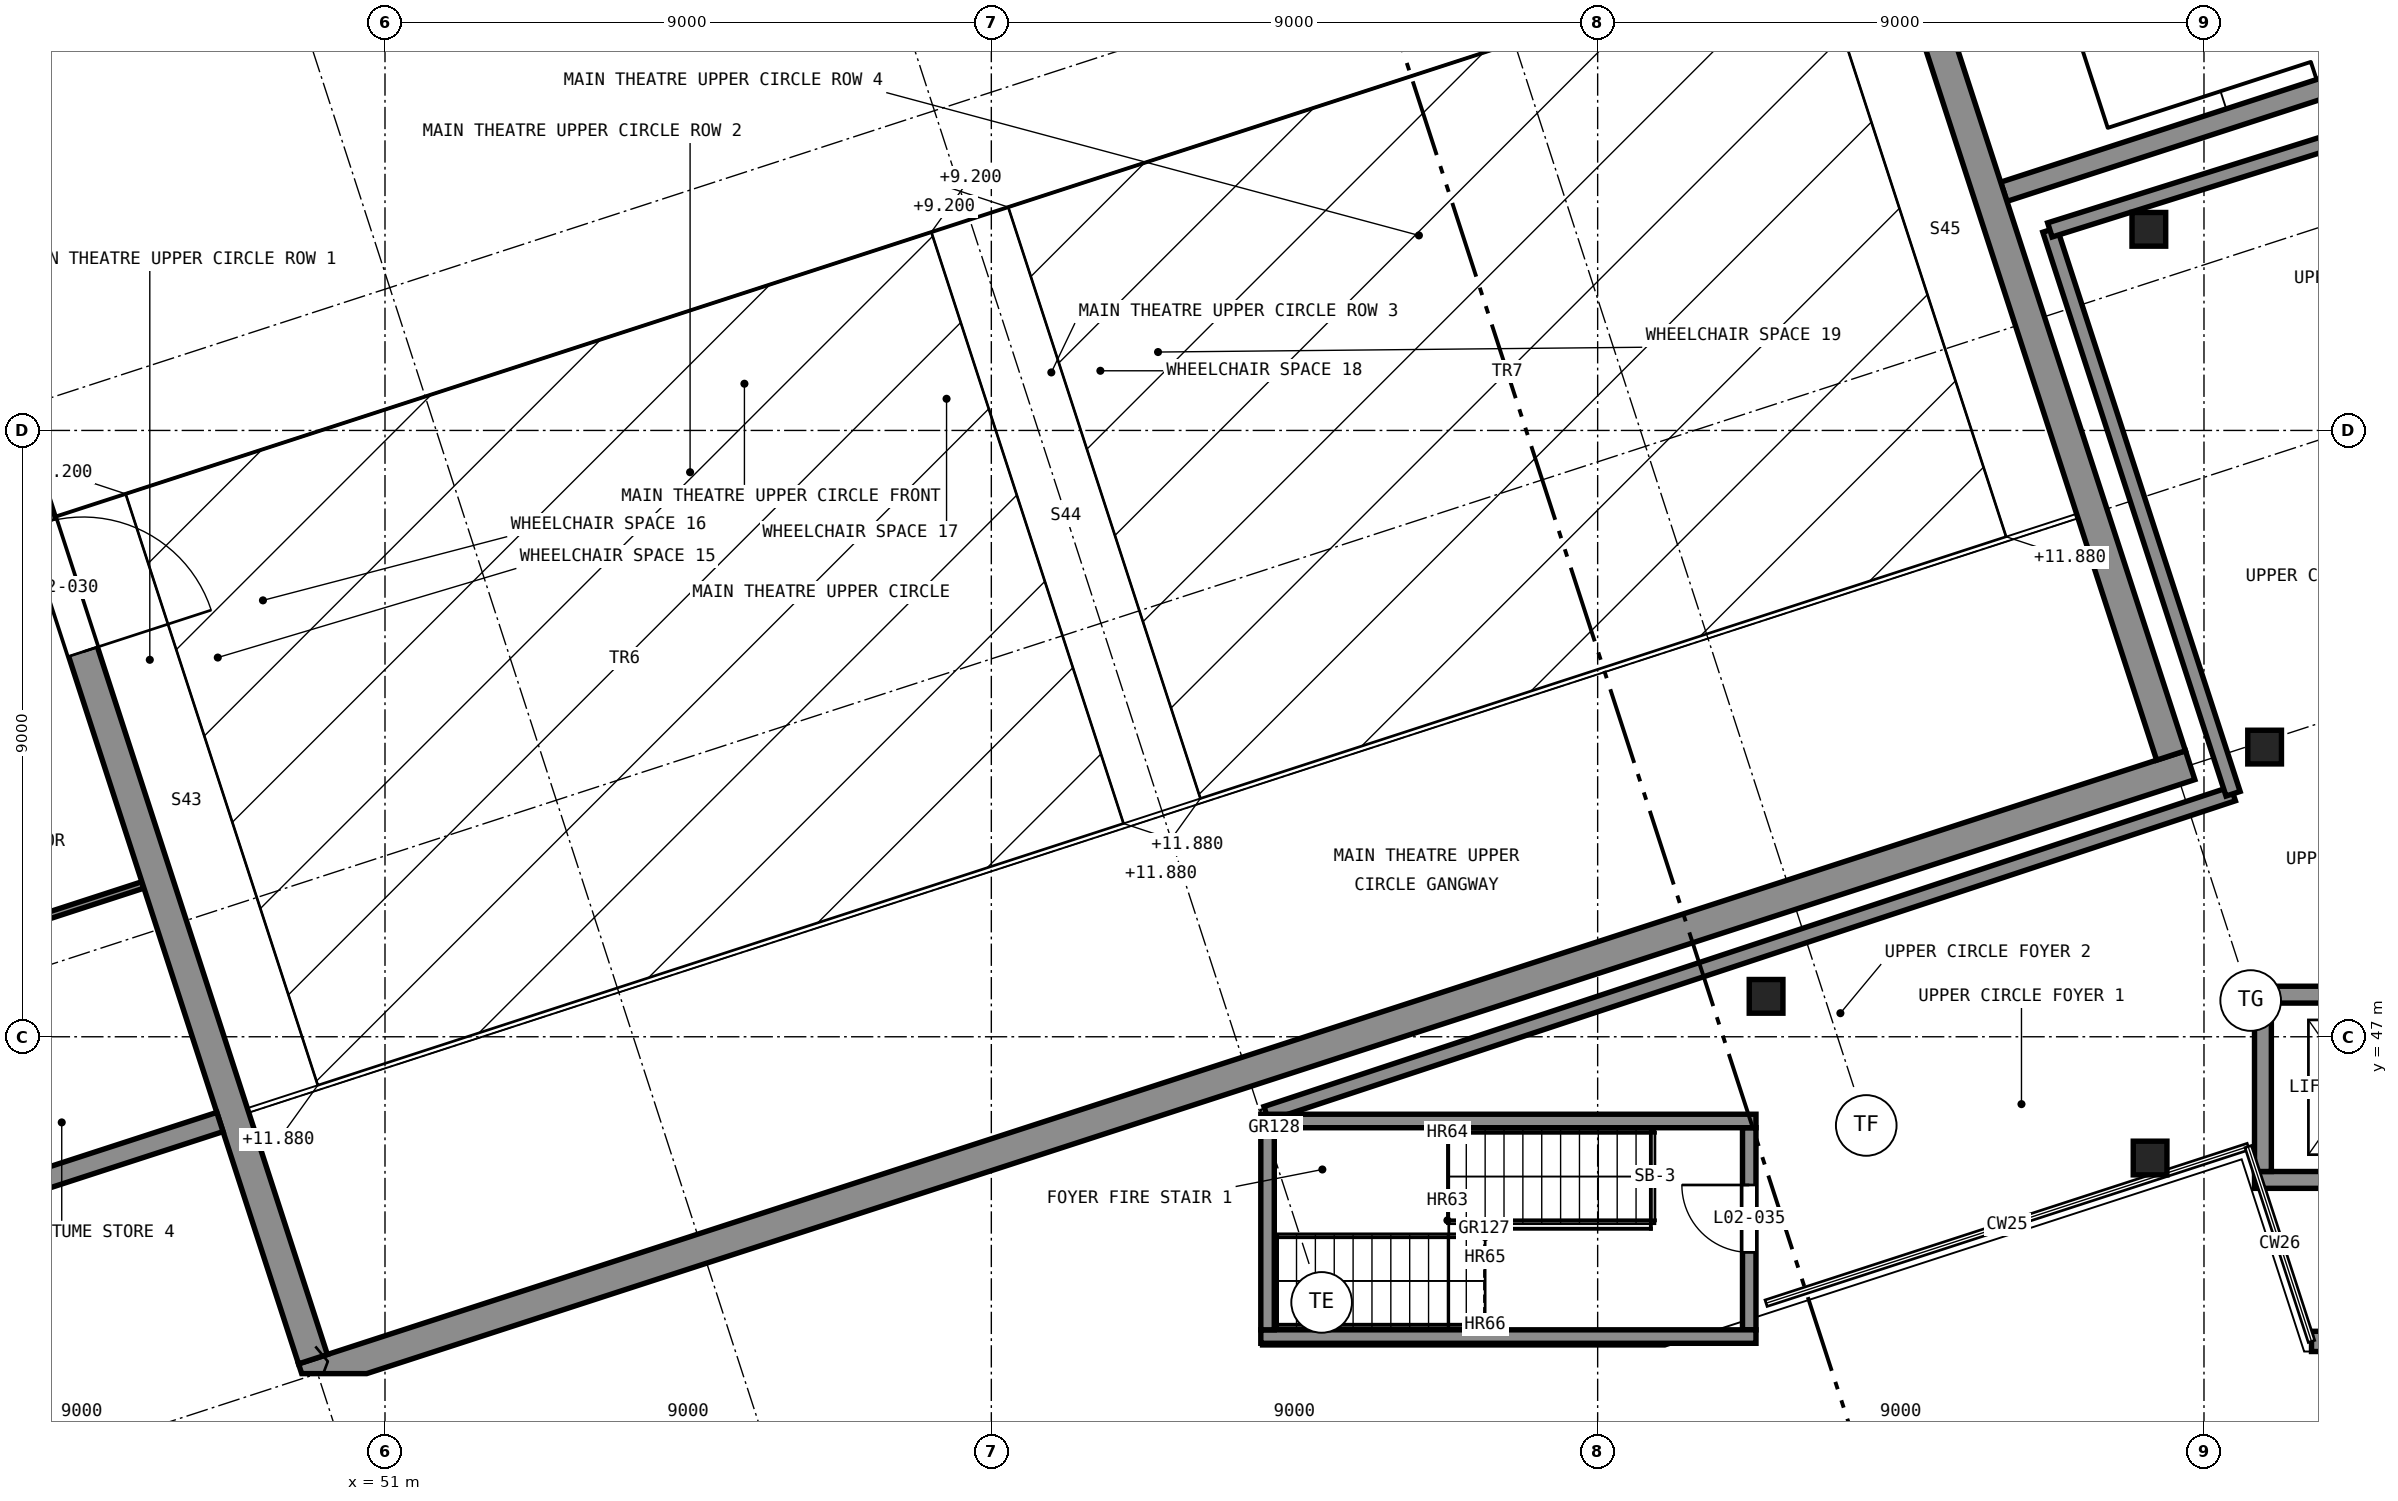
"""IFC4 building model, lengths in metres.
Left out: names, types, materials, properties, quantities, classifications, styles, units other than length and angle.
Written with IfcOpenShell. Run it as: python <this file> out.ifc"""

import sys

from ifc_helpers import new_model, si_unit, direction, frame, frame_2d, origin, origin_2d, place, context, subcontext, project, spatial, rectangle, extrude, element, fill, save


model = new_model("IFC4")
c1 = context("Model", 3, precision=1e-05, world=origin(), true_north=direction((0.0, 1.0)))
c2 = subcontext(c1, "Body", "Model", "MODEL_VIEW")
j1 = project(units=[si_unit("LENGTHUNIT", "METRE"), si_unit("PLANEANGLEUNIT", "RADIAN")], contexts=[c1])
p1 = place(None, origin())
s1 = spatial("IfcSite", under=j1, at=p1, CompositionType="ELEMENT")
p2 = place(p1, origin())
s2 = spatial("IfcBuilding", under=s1, at=p2, CompositionType="ELEMENT")
p3 = place(p2, frame((0.0, 0.0, 9.5)))
s3 = spatial("IfcBuildingStorey", under=s2, at=p3, CompositionType="ELEMENT", Elevation=9.5)
p4 = place(p3, frame((49.786, 41.93, 0.0), z_axis=(0.0, 0.0, 1.0), x_axis=(0.951055937194, 0.309018776661, 0.0)))
e1 = element("IfcWall", 1, at=p4, inside=s3, PredefinedType="SHEAR", context=c2, shape_type="SweptSolid", body=[
    extrude(rectangle(XDim=29.45, YDim=0.45, at=frame_2d((14.725, 0.0))), origin(), (0.0, 0.0, 1.0), 4.0),
])
p5 = place(p3, frame((49.93, 42.214, 0.0), z_axis=(0.0, 0.0, 1.0), x_axis=(-0.309016215614, 0.95105676933, 0.0)))
e2 = element("IfcWall", 2, at=p5, inside=s3, PredefinedType="SHEAR", context=c2, shape_type="SweptSolid", body=[
    extrude(rectangle(XDim=27.975, YDim=0.45, at=frame_2d((13.988, 0.0))), origin(), (0.0, 0.0, 1.0), 4.0),
])
p6 = place(p5, frame((11.042, 0.0, 0.0)))
e3 = element("IfcOpeningElement", 3, at=p6, cuts=e2, PredefinedType="OPENING", context=c2, shape_type="SweptSolid", body=[
    extrude(rectangle(XDim=2.0, YDim=2.4, at=frame_2d((1.0, 1.2))), frame((0.0, 0.235, 0.0), z_axis=(0.0, -1.0, 0.0), x_axis=(1.0, 0.0, 0.0)), (0.0, 0.0, 1.0), 0.47),
])
p7 = place(p3, frame((77.511, 51.176, 0.0), z_axis=(0.0, 0.0, 1.0), x_axis=(-0.309018780445, 0.951055935964, 0.0)))
e4 = element("IfcWall", 4, at=p7, inside=s3, PredefinedType="SHEAR", context=c2, shape_type="SweptSolid", body=[
    extrude(rectangle(XDim=27.975, YDim=0.45, at=frame_2d((13.987, 0.0))), origin(), (0.0, 0.0, 1.0), 4.0),
])
p8 = place(p7, frame((11.075, 0.0, 0.0)))
e5 = element("IfcOpeningElement", 5, at=p8, cuts=e4, PredefinedType="OPENING", context=c2, shape_type="SweptSolid", body=[
    extrude(rectangle(XDim=1.6, YDim=2.4, at=frame_2d((0.8, 1.2))), frame((0.0, 0.235, 0.0), z_axis=(0.0, -1.0, 0.0), x_axis=(1.0, 0.0, 0.0)), (0.0, 0.0, 1.0), 0.47),
])
p9 = place(p3, frame((48.55, 45.735, 0.0), z_axis=(0.0, 0.0, 1.0), x_axis=(-0.951061216338, -0.309002528757, 0.0)))
e6 = element("IfcWall", 6, at=p9, inside=s3, PredefinedType="SOLIDWALL", context=c2, shape_type="SweptSolid", body=[
    extrude(rectangle(XDim=15.925, YDim=0.3, at=frame_2d((7.962, 0.0))), origin(), (0.0, 0.0, 1.0), 4.0),
])
p10 = place(p3, frame((75.029, 59.543, 0.0), z_axis=(0.0, 0.0, 1.0), x_axis=(0.951057649576, 0.309013506475, 0.0)))
e7 = element("IfcWall", 7, at=p10, inside=s3, PredefinedType="SOLIDWALL", context=c2, shape_type="SweptSolid", body=[
    extrude(rectangle(XDim=7.075, YDim=0.3, at=frame_2d((3.538, 0.0))), origin(), (0.0, 0.0, 1.0), 3.7),
])
for number, where, z_axis, x_axis in (
    (8, (64.0, 42.55, 0.0), (0.0, 0.0, 1.0), (1.0, 0.0, 0.0)),
    (9, (71.35, 45.75, 0.0), (0.0, 0.0, 1.0), (-1.0, 0.0, 0.0)),
):
    element("IfcWall", number, at=place(p3, frame(where, z_axis=z_axis, x_axis=x_axis)), inside=s3, PredefinedType="SHEAR", context=c2, shape_type="SweptSolid", body=[
        extrude(rectangle(XDim=7.35, YDim=0.2, at=frame_2d((3.675, 0.0))), origin(), (0.0, 0.0, 1.0), 4.0),
    ])
p11 = place(p3, frame((64.1, 45.65, 0.0), z_axis=(0.0, 0.0, 1.0), x_axis=(0.0, -1.0, 0.0)))
e10 = element("IfcWall", 10, at=p11, inside=s3, PredefinedType="SHEAR", context=c2, shape_type="SweptSolid", body=[
    extrude(rectangle(XDim=3.0, YDim=0.2, at=frame_2d((1.5, 0.0))), origin(), (0.0, 0.0, 1.0), 4.0),
])
p12 = place(p3, frame((71.25, 42.65, 0.0), z_axis=(0.0, 0.0, 1.0), x_axis=(0.0, 1.0, 0.0)))
e11 = element("IfcWall", 11, at=p12, inside=s3, PredefinedType="SHEAR", context=c2, shape_type="SweptSolid", body=[
    extrude(rectangle(XDim=3.0, YDim=0.2, at=frame_2d((1.5, 0.0))), origin(), (0.0, 0.0, 1.0), 4.0),
])
p13 = place(p12, frame((1.15, 0.0, 0.0)))
e12 = element("IfcOpeningElement", 12, at=p13, cuts=e11, PredefinedType="OPENING", context=c2, shape_type="SweptSolid", body=[
    extrude(rectangle(XDim=1.0, YDim=2.1, at=frame_2d((0.5, 1.05))), frame((0.0, 0.11, 0.0), z_axis=(0.0, -1.0, 0.0), x_axis=(1.0, 0.0, 0.0)), (0.0, 0.0, 1.0), 0.22),
])
for number, where, z_axis, x_axis in (
    (13, (78.75, 44.875, 0.0), (0.0, 0.0, 1.0), (1.0, 0.0, 0.0)),
    (14, (81.75, 47.625, 0.0), (0.0, 0.0, 1.0), (-1.0, 0.0, 0.0)),
):
    element("IfcWall", number, at=place(p3, frame(where, z_axis=z_axis, x_axis=x_axis)), inside=s3, PredefinedType="SHEAR", context=c2, shape_type="SweptSolid", body=[
        extrude(rectangle(XDim=3.0, YDim=0.25, at=frame_2d((1.5, 0.0))), origin(), (0.0, 0.0, 1.0), 4.0),
    ])
p14 = place(p3, frame((78.875, 47.5, 0.0), z_axis=(0.0, 0.0, 1.0), x_axis=(0.0, -1.0, 0.0)))
e15 = element("IfcWall", 15, at=p14, inside=s3, PredefinedType="SHEAR", context=c2, shape_type="SweptSolid", body=[
    extrude(rectangle(XDim=2.5, YDim=0.25, at=frame_2d((1.25, 0.0))), origin(), (0.0, 0.0, 1.0), 4.0),
])
for number, where, z_axis, x_axis in (
    (16, (77.2, 45.2, 0.0), (0.0, 0.0, 1.0), (1.0, 0.0, 0.0)),
    (17, (71.5, 47.6, 0.0), (0.0, 0.0, 1.0), (1.0, 0.0, 0.0)),
    (18, (78.9, 51.3, 0.0), (0.0, 0.0, 1.0), (1.0, 0.0, 0.0)),
    (19, (77.182, 58.985, 0.0), (0.0, 0.0, 1.0), (1.0, 0.0, 0.0)),
):
    element("IfcColumn", number, at=place(p3, frame(where, z_axis=z_axis, x_axis=x_axis)), inside=s3, PredefinedType="COLUMN", context=c2, shape_type="SweptSolid", body=[
        extrude(rectangle(XDim=0.5, YDim=0.5, at=origin_2d()), origin(), (0.0, 0.0, 1.0), 4.0),
    ])
p15 = place(p3, frame((79.596, 42.478, 0.0), z_axis=(0.0, 0.0, 1.0), x_axis=(1.0, 0.0, 0.0)))
e20 = element("IfcWall", 20, at=p15, inside=s3, PredefinedType="SOLIDWALL", context=c2, shape_type="SweptSolid", body=[
    extrude(rectangle(XDim=2.941, YDim=0.3, at=frame_2d((1.471, 0.0))), origin(), (0.0, 0.0, 1.0), 3.7),
])
p16 = place(p3, frame((64.081, 45.859, 0.0), z_axis=(0.0, 0.0, 1.0), x_axis=(0.949388338269, 0.314104732786, 0.0)))
e21 = element("IfcWall", 21, at=p16, inside=s3, PredefinedType="SOLIDWALL", context=c2, shape_type="SweptSolid", body=[
    extrude(rectangle(XDim=15.116, YDim=0.22, at=frame_2d((7.558, 0.0))), origin(), (0.0, 0.0, 1.0), 3.7),
])
p17 = place(p3, frame((78.432, 50.607, 0.0), z_axis=(0.0, 0.0, 1.0), x_axis=(-0.309027731765, 0.951053027439, 0.0)))
e22 = element("IfcWall", 22, at=p17, inside=s3, PredefinedType="SOLIDWALL", context=c2, shape_type="SweptSolid", body=[
    extrude(rectangle(XDim=8.8, YDim=0.22, at=frame_2d((4.4, 0.0))), origin(), (0.0, 0.0, 1.0), 3.7),
])
p18 = place(p3, frame((75.712, 58.977, 0.0), z_axis=(0.0, 0.0, 1.0), x_axis=(0.954020604523, 0.299741031802, 0.0)))
e23 = element("IfcWall", 23, at=p18, inside=s3, PredefinedType="SOLIDWALL", context=c2, shape_type="SweptSolid", body=[
    extrude(rectangle(XDim=7.271, YDim=0.22, at=frame_2d((3.635, 0.0))), origin(), (0.0, 0.0, 1.0), 3.7),
])
p19 = place(p3, frame((44.53, 48.319, 0.0), z_axis=(0.0, 0.0, 1.0), x_axis=(0.951053046121, 0.30902767427, 0.0)))
e24 = element("IfcWall", 24, at=p19, inside=s3, PredefinedType="PARTITIONING", context=c2, shape_type="SweptSolid", body=[
    extrude(rectangle(XDim=3.025, YDim=0.1, at=frame_2d((1.512, 0.0))), origin(), (0.0, 0.0, 1.0), 3.7),
])
p20 = place(p19, frame((0.533, 0.0, 0.0)))
e25 = element("IfcOpeningElement", 25, at=p20, cuts=e24, PredefinedType="OPENING", context=c2, shape_type="SweptSolid", body=[
    extrude(rectangle(XDim=0.9, YDim=2.1, at=frame_2d((0.45, 1.05))), frame((0.0, 0.06, 0.0), z_axis=(0.0, -1.0, 0.0), x_axis=(1.0, 0.0, 0.0)), (0.0, 0.0, 1.0), 0.12),
])
p21 = place(p6, frame((2.0, 0.0, 0.0), z_axis=(0.0, 0.0, 1.0), x_axis=(-1.0, 0.0, 0.0)))
e26 = element("IfcDoor", 26, at=p21, inside=s3, OperationType="DOUBLE_DOOR_SINGLE_SWING", PredefinedType="DOOR", context=c2, shape_type="SweptSolid", body=[
    extrude(rectangle(XDim=2.0, YDim=2.4, at=frame_2d((1.0, 1.2))), frame((0.0, 0.025, 0.0), z_axis=(0.0, -1.0, 0.0), x_axis=(1.0, 0.0, 0.0)), (0.0, 0.0, 1.0), 0.05),
])
fill(e3, e26)
p22 = place(p13, origin())
e27 = element("IfcDoor", 27, at=p22, inside=s3, OperationType="SINGLE_SWING_LEFT", PredefinedType="DOOR", context=c2, shape_type="SweptSolid", body=[
    extrude(rectangle(XDim=1.0, YDim=2.1, at=frame_2d((0.5, 1.05))), frame((0.0, 0.025, 0.0), z_axis=(0.0, -1.0, 0.0), x_axis=(1.0, 0.0, 0.0)), (0.0, 0.0, 1.0), 0.05),
])
fill(e12, e27)
save(model, sys.argv[1])
